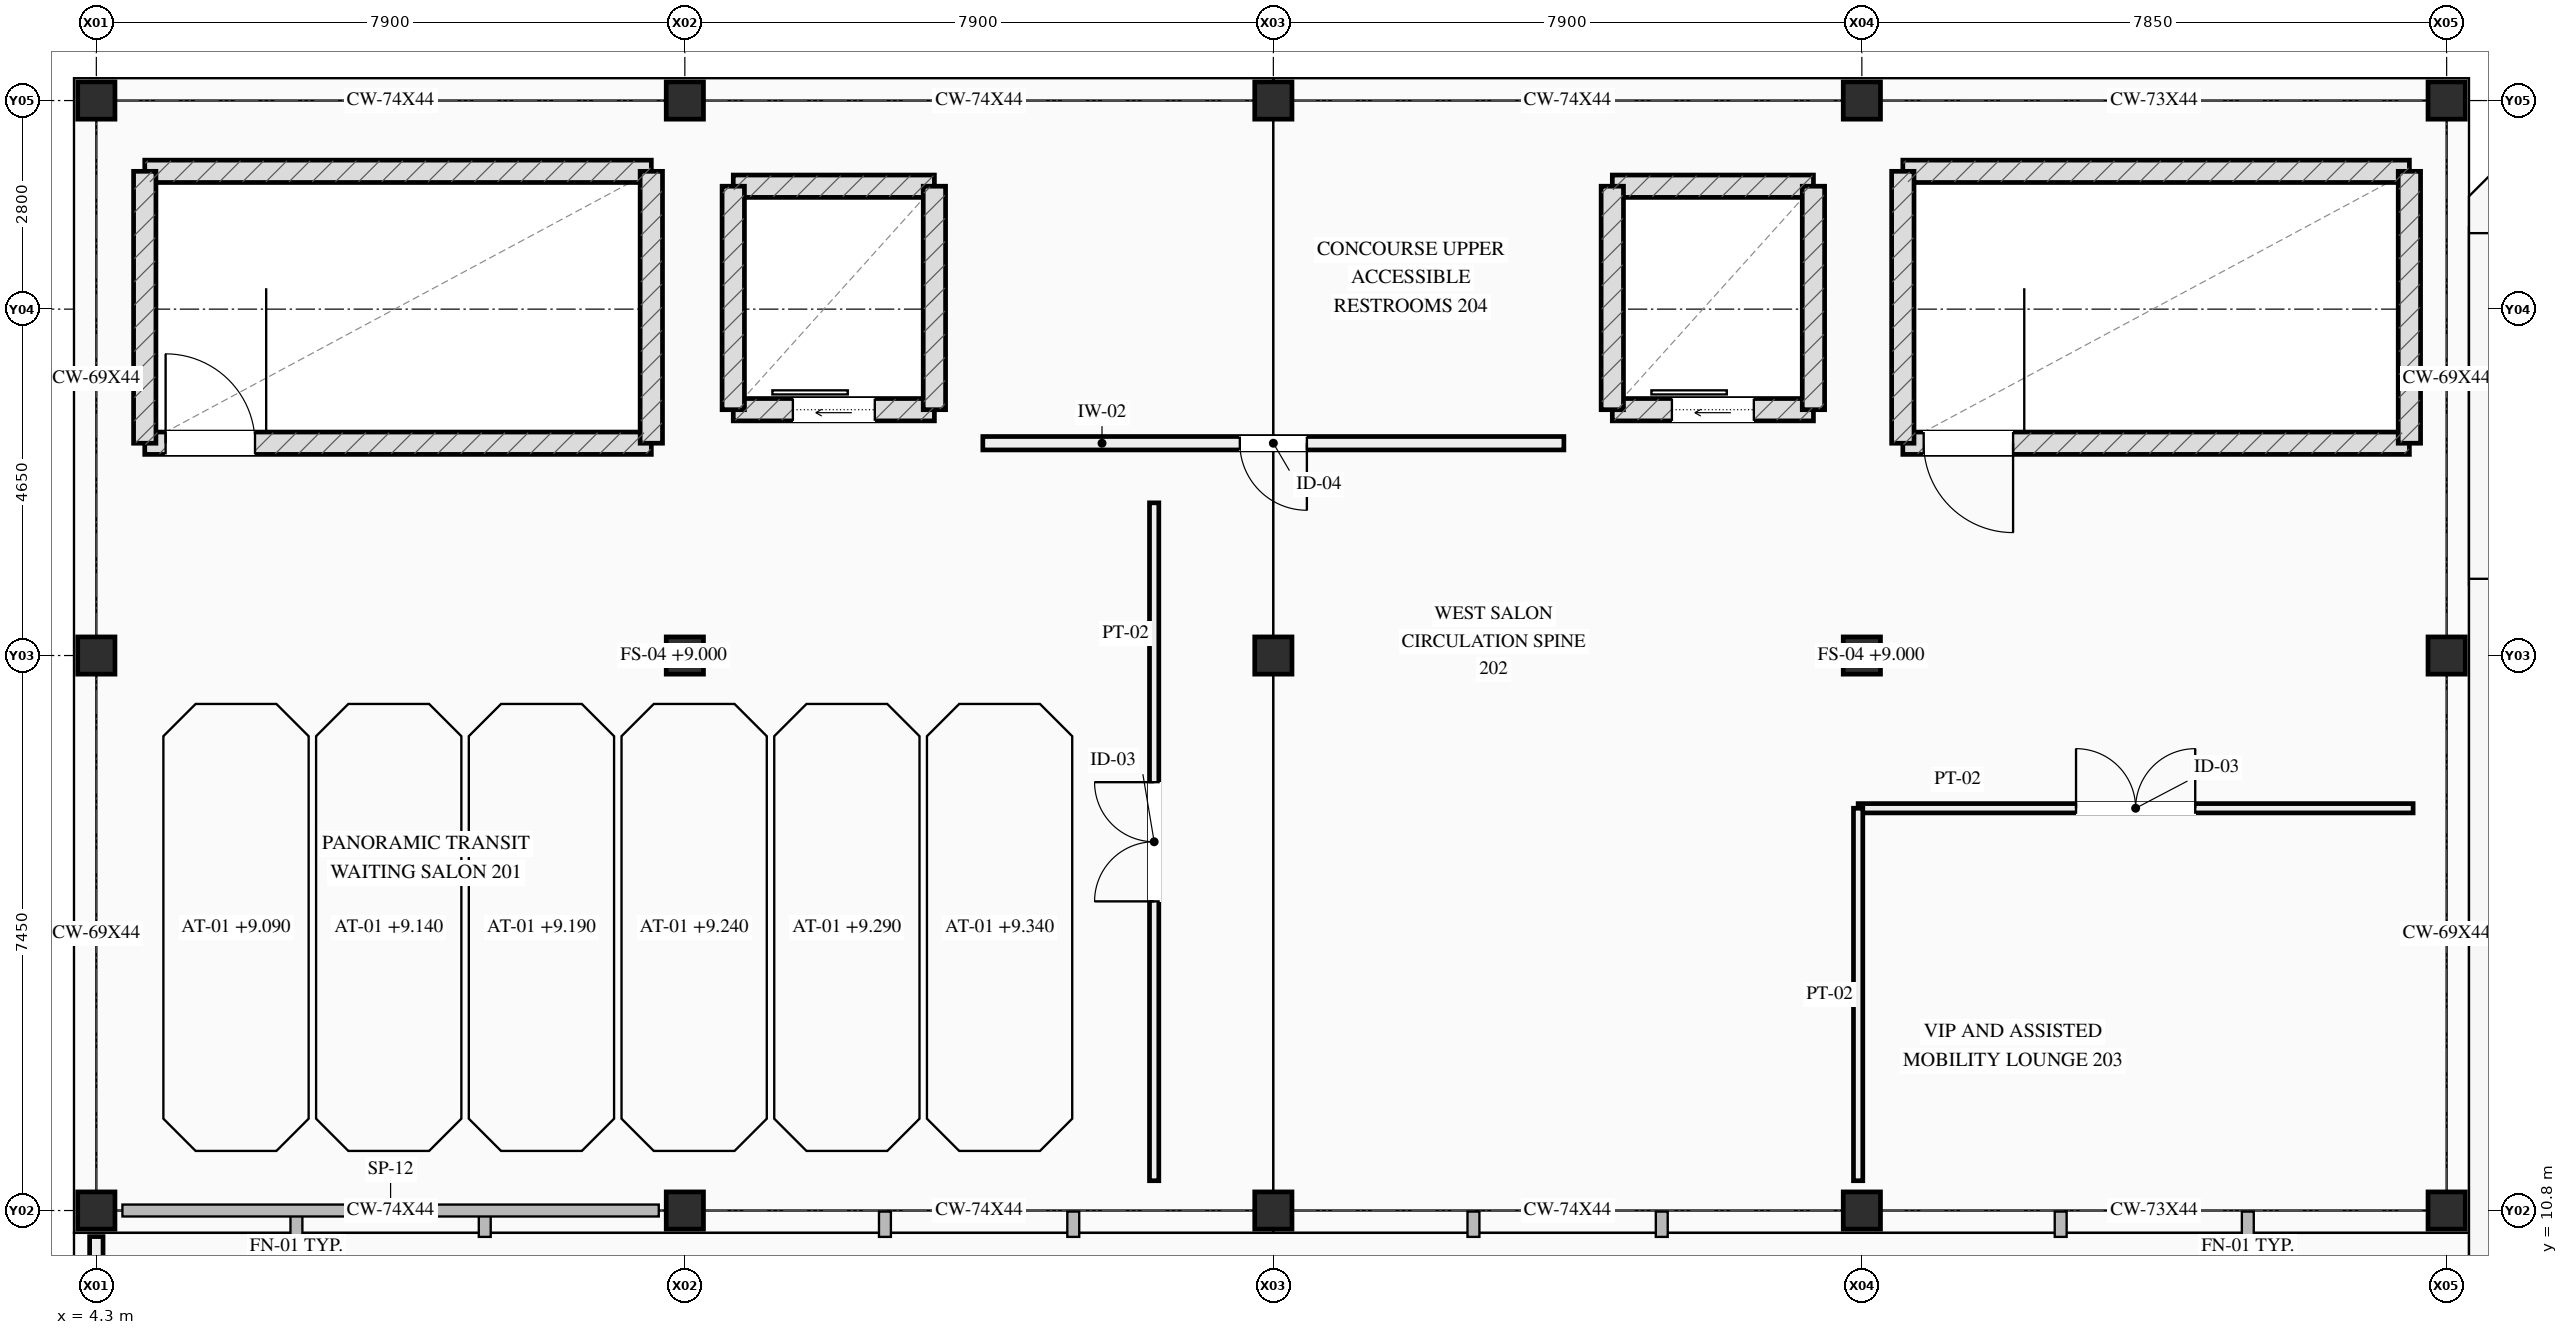
"""IFC4 building model, lengths in metres.
Left out: names, types, materials, properties, quantities, classifications, styles, units other than length and angle.
Written with IfcOpenShell. Run it as: python <this file> out.ifc"""

import sys

from ifc_helpers import new_model, si_unit, direction, frame, frame_2d, origin, origin_2d, place, context, subcontext, project, spatial, rectangle, extrude, element, fill, save


model = new_model("IFC4")
c1 = context("Model", 3, precision=1e-05, world=origin(), true_north=direction((0.0, 1.0)))
c2 = subcontext(c1, "Body", "Model", "MODEL_VIEW")
j1 = project(units=[si_unit("LENGTHUNIT", "METRE"), si_unit("PLANEANGLEUNIT", "RADIAN")], contexts=[c1])
p1 = place(None, origin())
s1 = spatial("IfcSite", under=j1, at=p1, CompositionType="ELEMENT")
p2 = place(p1, origin())
s2 = spatial("IfcBuilding", under=s1, at=p2, CompositionType="ELEMENT")
p3 = place(p2, frame((0.0, 0.0, 9.0)))
s3 = spatial("IfcBuildingStorey", under=s2, at=p3, CompositionType="ELEMENT", Elevation=9.0)
for number, where, z_axis, x_axis in (
    (1, (4.3, 10.8, 0.0), (0.0, 0.0, 1.0), (1.0, 0.0, 0.0)),
    (2, (4.3, 18.25, 0.0), (0.0, 0.0, 1.0), (1.0, 0.0, 0.0)),
    (3, (4.3, 25.7, 0.0), (0.0, 0.0, 1.0), (1.0, 0.0, 0.0)),
    (4, (12.2, 10.8, 0.0), (0.0, 0.0, 1.0), (1.0, 0.0, 0.0)),
    (5, (12.2, 18.25, 0.0), (0.0, 0.0, 1.0), (1.0, 0.0, 0.0)),
    (6, (12.2, 25.7, 0.0), (0.0, 0.0, 1.0), (1.0, 0.0, 0.0)),
    (7, (20.1, 10.8, 0.0), (0.0, 0.0, 1.0), (1.0, 0.0, 0.0)),
    (8, (20.1, 18.25, 0.0), (0.0, 0.0, 1.0), (1.0, 0.0, 0.0)),
    (9, (20.1, 25.7, 0.0), (0.0, 0.0, 1.0), (1.0, 0.0, 0.0)),
    (10, (28.0, 10.8, 0.0), (0.0, 0.0, 1.0), (1.0, 0.0, 0.0)),
    (11, (28.0, 18.25, 0.0), (0.0, 0.0, 1.0), (1.0, 0.0, 0.0)),
    (12, (28.0, 25.7, 0.0), (0.0, 0.0, 1.0), (1.0, 0.0, 0.0)),
    (13, (35.85, 10.8, 0.0), (0.0, 0.0, 1.0), (1.0, 0.0, 0.0)),
    (14, (35.85, 18.25, 0.0), (0.0, 0.0, 1.0), (1.0, 0.0, 0.0)),
    (15, (35.85, 25.7, 0.0), (0.0, 0.0, 1.0), (1.0, 0.0, 0.0)),
):
    element("IfcColumn", number, at=place(p3, frame(where, z_axis=z_axis, x_axis=x_axis)), inside=s3, PredefinedType="COLUMN", context=c2, shape_type="SweptSolid", body=[
        extrude(rectangle(XDim=0.5, YDim=0.5, at=origin_2d()), origin(), (0.0, 0.0, 1.0), 5.4),
    ])
p4 = place(p3, frame((4.3, 6.35, 0.0), z_axis=(0.0, 0.0, 1.0), x_axis=(0.0, 1.0, 0.0)))
e16 = element("IfcWall", 16, at=p4, inside=s3, PredefinedType="PARAPET", context=c2, shape_type="SweptSolid", body=[
    extrude(rectangle(XDim=4.1, YDim=0.18, at=frame_2d((2.05, 0.0))), origin(), (0.0, 0.0, 1.0), 0.85),
])
p5 = place(p3, frame((4.95, 21.1, 0.0), z_axis=(0.0, 0.0, 1.0), x_axis=(1.0, 0.0, 0.0)))
e17 = element("IfcWall", 17, at=p5, inside=s3, PredefinedType="SHEAR", context=c2, shape_type="SweptSolid", body=[
    extrude(rectangle(XDim=6.8, YDim=0.3, at=frame_2d((3.4, 0.0))), origin(), (0.0, 0.0, 1.0), 5.175),
])
p6 = place(p5, frame((0.28, 0.0, 0.0)))
e18 = element("IfcOpeningElement", 18, at=p6, cuts=e17, PredefinedType="OPENING", context=c2, shape_type="SweptSolid", body=[
    extrude(rectangle(XDim=1.2, YDim=2.2, at=frame_2d((0.6, 1.1))), frame((0.0, 0.16, 0.0), z_axis=(0.0, -1.0, 0.0), x_axis=(1.0, 0.0, 0.0)), (0.0, 0.0, 1.0), 0.32),
])
p7 = place(p3, frame((11.75, 24.75, 0.0), z_axis=(0.0, 0.0, 1.0), x_axis=(-1.0, 0.0, 0.0)))
e19 = element("IfcWall", 19, at=p7, inside=s3, PredefinedType="SHEAR", context=c2, shape_type="SweptSolid", body=[
    extrude(rectangle(XDim=6.8, YDim=0.3, at=frame_2d((3.4, 0.0))), origin(), (0.0, 0.0, 1.0), 5.175),
])
for number, where, z_axis, x_axis in (
    (20, (4.95, 24.75, 0.0), (0.0, 0.0, 1.0), (0.0, -1.0, 0.0)),
    (21, (11.75, 21.1, 0.0), (0.0, 0.0, 1.0), (0.0, 1.0, 0.0)),
):
    element("IfcWall", number, at=place(p3, frame(where, z_axis=z_axis, x_axis=x_axis)), inside=s3, PredefinedType="SHEAR", context=c2, shape_type="SweptSolid", body=[
        extrude(rectangle(XDim=3.65, YDim=0.3, at=frame_2d((1.825, 0.0))), origin(), (0.0, 0.0, 1.0), 5.175),
    ])
p8 = place(p3, frame((12.85, 21.55, 0.0), z_axis=(0.0, 0.0, 1.0), x_axis=(1.0, 0.0, 0.0)))
e22 = element("IfcWall", 22, at=p8, inside=s3, PredefinedType="SHEAR", context=c2, shape_type="SweptSolid", body=[
    extrude(rectangle(XDim=2.7, YDim=0.3, at=frame_2d((1.35, 0.0))), origin(), (0.0, 0.0, 1.0), 5.205),
])
p9 = place(p8, frame((0.8, 0.0, 0.0)))
e23 = element("IfcOpeningElement", 23, at=p9, cuts=e22, PredefinedType="OPENING", context=c2, shape_type="SweptSolid", body=[
    extrude(rectangle(XDim=1.1, YDim=2.2, at=frame_2d((0.55, 1.1))), frame((0.0, 0.16, 0.0), z_axis=(0.0, -1.0, 0.0), x_axis=(1.0, 0.0, 0.0)), (0.0, 0.0, 1.0), 0.32),
])
p10 = place(p3, frame((12.85, 24.55, 0.0), z_axis=(0.0, 0.0, 1.0), x_axis=(1.0, 0.0, 0.0)))
e24 = element("IfcWall", 24, at=p10, inside=s3, PredefinedType="SHEAR", context=c2, shape_type="SweptSolid", body=[
    extrude(rectangle(XDim=2.7, YDim=0.3, at=frame_2d((1.35, 0.0))), origin(), (0.0, 0.0, 1.0), 5.205),
])
for number, where, z_axis, x_axis in (
    (25, (12.85, 21.55, 0.0), (0.0, 0.0, 1.0), (0.0, 1.0, 0.0)),
    (26, (15.55, 21.55, 0.0), (0.0, 0.0, 1.0), (0.0, 1.0, 0.0)),
):
    element("IfcWall", number, at=place(p3, frame(where, z_axis=z_axis, x_axis=x_axis)), inside=s3, PredefinedType="SHEAR", context=c2, shape_type="SweptSolid", body=[
        extrude(rectangle(XDim=3.0, YDim=0.3, at=frame_2d((1.5, 0.0))), origin(), (0.0, 0.0, 1.0), 5.205),
    ])
p11 = place(p3, frame((28.55, 21.1, 0.0), z_axis=(0.0, 0.0, 1.0), x_axis=(1.0, 0.0, 0.0)))
e27 = element("IfcWall", 27, at=p11, inside=s3, PredefinedType="SHEAR", context=c2, shape_type="SweptSolid", body=[
    extrude(rectangle(XDim=6.8, YDim=0.3, at=frame_2d((3.4, 0.0))), origin(), (0.0, 0.0, 1.0), 5.175),
])
p12 = place(p11, frame((0.28, 0.0, 0.0)))
e28 = element("IfcOpeningElement", 28, at=p12, cuts=e27, PredefinedType="OPENING", context=c2, shape_type="SweptSolid", body=[
    extrude(rectangle(XDim=1.2, YDim=2.2, at=frame_2d((0.6, 1.1))), frame((0.0, 0.16, 0.0), z_axis=(0.0, -1.0, 0.0), x_axis=(1.0, 0.0, 0.0)), (0.0, 0.0, 1.0), 0.32),
])
p13 = place(p3, frame((35.35, 24.75, 0.0), z_axis=(0.0, 0.0, 1.0), x_axis=(-1.0, 0.0, 0.0)))
e29 = element("IfcWall", 29, at=p13, inside=s3, PredefinedType="SHEAR", context=c2, shape_type="SweptSolid", body=[
    extrude(rectangle(XDim=6.8, YDim=0.3, at=frame_2d((3.4, 0.0))), origin(), (0.0, 0.0, 1.0), 5.175),
])
for number, where, z_axis, x_axis in (
    (30, (28.55, 24.75, 0.0), (0.0, 0.0, 1.0), (0.0, -1.0, 0.0)),
    (31, (35.35, 21.1, 0.0), (0.0, 0.0, 1.0), (0.0, 1.0, 0.0)),
):
    element("IfcWall", number, at=place(p3, frame(where, z_axis=z_axis, x_axis=x_axis)), inside=s3, PredefinedType="SHEAR", context=c2, shape_type="SweptSolid", body=[
        extrude(rectangle(XDim=3.65, YDim=0.3, at=frame_2d((1.825, 0.0))), origin(), (0.0, 0.0, 1.0), 5.175),
    ])
p14 = place(p3, frame((24.65, 21.55, 0.0), z_axis=(0.0, 0.0, 1.0), x_axis=(1.0, 0.0, 0.0)))
e32 = element("IfcWall", 32, at=p14, inside=s3, PredefinedType="SHEAR", context=c2, shape_type="SweptSolid", body=[
    extrude(rectangle(XDim=2.7, YDim=0.3, at=frame_2d((1.35, 0.0))), origin(), (0.0, 0.0, 1.0), 5.205),
])
p15 = place(p14, frame((0.8, 0.0, 0.0)))
e33 = element("IfcOpeningElement", 33, at=p15, cuts=e32, PredefinedType="OPENING", context=c2, shape_type="SweptSolid", body=[
    extrude(rectangle(XDim=1.1, YDim=2.2, at=frame_2d((0.55, 1.1))), frame((0.0, 0.16, 0.0), z_axis=(0.0, -1.0, 0.0), x_axis=(1.0, 0.0, 0.0)), (0.0, 0.0, 1.0), 0.32),
])
p16 = place(p3, frame((24.65, 24.55, 0.0), z_axis=(0.0, 0.0, 1.0), x_axis=(1.0, 0.0, 0.0)))
e34 = element("IfcWall", 34, at=p16, inside=s3, PredefinedType="SHEAR", context=c2, shape_type="SweptSolid", body=[
    extrude(rectangle(XDim=2.7, YDim=0.3, at=frame_2d((1.35, 0.0))), origin(), (0.0, 0.0, 1.0), 5.205),
])
for number, where, z_axis, x_axis in (
    (35, (24.65, 21.55, 0.0), (0.0, 0.0, 1.0), (0.0, 1.0, 0.0)),
    (36, (27.35, 21.55, 0.0), (0.0, 0.0, 1.0), (0.0, 1.0, 0.0)),
):
    element("IfcWall", number, at=place(p3, frame(where, z_axis=z_axis, x_axis=x_axis)), inside=s3, PredefinedType="SHEAR", context=c2, shape_type="SweptSolid", body=[
        extrude(rectangle(XDim=3.0, YDim=0.3, at=frame_2d((1.5, 0.0))), origin(), (0.0, 0.0, 1.0), 5.205),
    ])
p17 = place(p3, frame((18.5, 11.2, 0.0), z_axis=(0.0, 0.0, 1.0), x_axis=(0.0, 1.0, 0.0)))
e37 = element("IfcWall", 37, at=p17, inside=s3, PredefinedType="PARTITIONING", context=c2, shape_type="SweptSolid", body=[
    extrude(rectangle(XDim=9.1, YDim=0.125, at=frame_2d((4.55, 0.0))), origin(), (0.0, 0.0, 1.0), 3.3),
])
p18 = place(p17, frame((3.75, 0.0, 0.0)))
e38 = element("IfcOpeningElement", 38, at=p18, cuts=e37, PredefinedType="OPENING", context=c2, shape_type="SweptSolid", body=[
    extrude(rectangle(XDim=1.6, YDim=2.2, at=frame_2d((0.8, 1.1))), frame((0.0, 0.073, 0.0), z_axis=(0.0, -1.0, 0.0), x_axis=(1.0, 0.0, 0.0)), (0.0, 0.0, 1.0), 0.145),
])
p19 = place(p3, frame((27.95, 16.2, 0.0), z_axis=(0.0, 0.0, 1.0), x_axis=(1.0, 0.0, 0.0)))
e39 = element("IfcWall", 39, at=p19, inside=s3, PredefinedType="PARTITIONING", context=c2, shape_type="SweptSolid", body=[
    extrude(rectangle(XDim=7.45, YDim=0.125, at=frame_2d((3.725, 0.0))), origin(), (0.0, 0.0, 1.0), 3.3),
])
p20 = place(p19, frame((2.925, 0.0, 0.0)))
e40 = element("IfcOpeningElement", 40, at=p20, cuts=e39, PredefinedType="OPENING", context=c2, shape_type="SweptSolid", body=[
    extrude(rectangle(XDim=1.6, YDim=2.2, at=frame_2d((0.8, 1.1))), frame((0.0, 0.073, 0.0), z_axis=(0.0, -1.0, 0.0), x_axis=(1.0, 0.0, 0.0)), (0.0, 0.0, 1.0), 0.145),
])
p21 = place(p3, frame((27.95, 11.2, 0.0), z_axis=(0.0, 0.0, 1.0), x_axis=(0.0, 1.0, 0.0)))
e41 = element("IfcWall", 41, at=p21, inside=s3, PredefinedType="PARTITIONING", context=c2, shape_type="SweptSolid", body=[
    extrude(rectangle(XDim=5.0, YDim=0.125, at=frame_2d((2.5, 0.0))), origin(), (0.0, 0.0, 1.0), 3.3),
])
p22 = place(p3, frame((16.2, 21.1, 0.0), z_axis=(0.0, 0.0, 1.0), x_axis=(1.0, 0.0, 0.0)))
e42 = element("IfcWall", 42, at=p22, inside=s3, PredefinedType="PLUMBINGWALL", context=c2, shape_type="SweptSolid", body=[
    extrude(rectangle(XDim=7.8, YDim=0.18, at=frame_2d((3.9, 0.0))), origin(), (0.0, 0.0, 1.0), 3.3),
])
p23 = place(p22, frame((3.45, 0.0, 0.0)))
e43 = element("IfcOpeningElement", 43, at=p23, cuts=e42, PredefinedType="OPENING", context=c2, shape_type="SweptSolid", body=[
    extrude(rectangle(XDim=0.9, YDim=2.1, at=frame_2d((0.45, 1.05))), frame((0.0, 0.1, 0.0), z_axis=(0.0, -1.0, 0.0), x_axis=(1.0, 0.0, 0.0)), (0.0, 0.0, 1.0), 0.2),
])
p24 = place(p6, origin())
e44 = element("IfcDoor", 44, at=p24, inside=s3, OperationType="SINGLE_SWING_LEFT", PredefinedType="DOOR", context=c2, shape_type="SweptSolid", body=[
    extrude(rectangle(XDim=1.2, YDim=2.2, at=frame_2d((0.6, 1.1))), frame((0.0, 0.025, 0.0), z_axis=(0.0, -1.0, 0.0), x_axis=(1.0, 0.0, 0.0)), (0.0, 0.0, 1.0), 0.05),
])
fill(e18, e44)
p25 = place(p9, origin())
e45 = element("IfcDoor", 45, at=p25, inside=s3, OperationType="SLIDING_TO_LEFT", PredefinedType="DOOR", context=c2, shape_type="SweptSolid", body=[
    extrude(rectangle(XDim=1.1, YDim=2.2, at=frame_2d((0.55, 1.1))), frame((0.0, 0.025, 0.0), z_axis=(0.0, -1.0, 0.0), x_axis=(1.0, 0.0, 0.0)), (0.0, 0.0, 1.0), 0.05),
])
fill(e23, e45)
p26 = place(p12, origin())
e46 = element("IfcDoor", 46, at=p26, inside=s3, OperationType="SINGLE_SWING_RIGHT", PredefinedType="DOOR", context=c2, shape_type="SweptSolid", body=[
    extrude(rectangle(XDim=1.2, YDim=2.2, at=frame_2d((0.6, 1.1))), frame((0.0, 0.025, 0.0), z_axis=(0.0, -1.0, 0.0), x_axis=(1.0, 0.0, 0.0)), (0.0, 0.0, 1.0), 0.05),
])
fill(e28, e46)
p27 = place(p15, origin())
e47 = element("IfcDoor", 47, at=p27, inside=s3, OperationType="SLIDING_TO_LEFT", PredefinedType="DOOR", context=c2, shape_type="SweptSolid", body=[
    extrude(rectangle(XDim=1.1, YDim=2.2, at=frame_2d((0.55, 1.1))), frame((0.0, 0.025, 0.0), z_axis=(0.0, -1.0, 0.0), x_axis=(1.0, 0.0, 0.0)), (0.0, 0.0, 1.0), 0.05),
])
fill(e33, e47)
p28 = place(p18, origin())
e48 = element("IfcDoor", 48, at=p28, inside=s3, OperationType="DOUBLE_DOOR_SINGLE_SWING", PredefinedType="DOOR", context=c2, shape_type="SweptSolid", body=[
    extrude(rectangle(XDim=1.6, YDim=2.2, at=frame_2d((0.8, 1.1))), frame((0.0, 0.025, 0.0), z_axis=(0.0, -1.0, 0.0), x_axis=(1.0, 0.0, 0.0)), (0.0, 0.0, 1.0), 0.05),
])
fill(e38, e48)
p29 = place(p20, origin())
e49 = element("IfcDoor", 49, at=p29, inside=s3, OperationType="DOUBLE_DOOR_SINGLE_SWING", PredefinedType="DOOR", context=c2, shape_type="SweptSolid", body=[
    extrude(rectangle(XDim=1.6, YDim=2.2, at=frame_2d((0.8, 1.1))), frame((0.0, 0.025, 0.0), z_axis=(0.0, -1.0, 0.0), x_axis=(1.0, 0.0, 0.0)), (0.0, 0.0, 1.0), 0.05),
])
fill(e40, e49)
p30 = place(p23, origin())
e50 = element("IfcDoor", 50, at=p30, inside=s3, OperationType="SINGLE_SWING_RIGHT", PredefinedType="DOOR", context=c2, shape_type="SweptSolid", body=[
    extrude(rectangle(XDim=0.9, YDim=2.1, at=frame_2d((0.45, 1.05))), frame((0.0, 0.025, 0.0), z_axis=(0.0, -1.0, 0.0), x_axis=(1.0, 0.0, 0.0)), (0.0, 0.0, 1.0), 0.05),
])
fill(e43, e50)
save(model, sys.argv[1])
